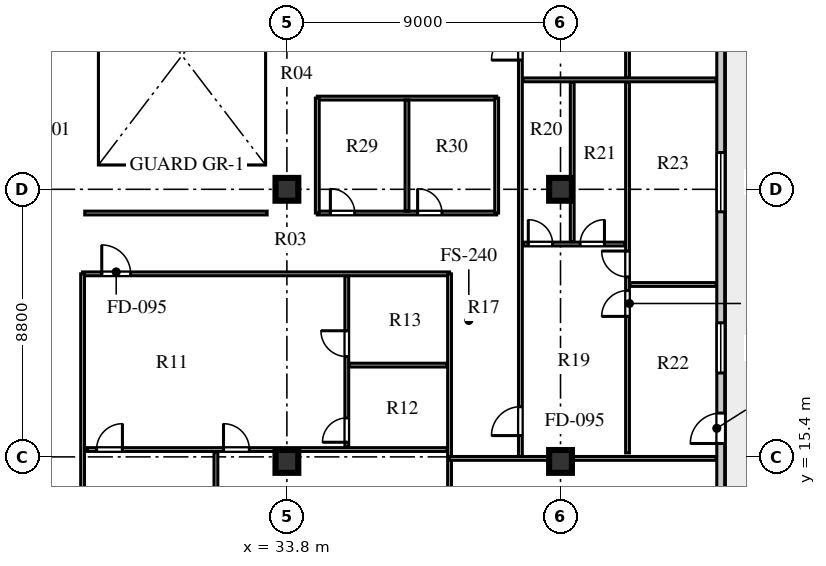
"""IFC4 building model, lengths in metres.
Left out: names, types, materials, properties, quantities, classifications, styles, units other than length and angle.
Written with IfcOpenShell. Run it as: python <this file> out.ifc"""

import sys

from ifc_helpers import new_model, si_unit, direction, frame, frame_2d, origin, origin_2d, place, context, subcontext, project, spatial, rectangle, extrude, element, fill, save


model = new_model("IFC4")
c1 = context("Model", 3, precision=1e-05, world=origin(), true_north=direction((0.0, 1.0)))
c2 = subcontext(c1, "Body", "Model", "MODEL_VIEW")
j1 = project(units=[si_unit("LENGTHUNIT", "METRE"), si_unit("PLANEANGLEUNIT", "RADIAN")], contexts=[c1])
p1 = place(None, origin())
s1 = spatial("IfcSite", under=j1, at=p1, CompositionType="ELEMENT")
p2 = place(p1, origin())
s2 = spatial("IfcBuilding", under=s1, at=p2, CompositionType="ELEMENT")
p3 = place(p2, frame((0.0, 0.0, 272.6)))
s3 = spatial("IfcBuildingStorey", under=s2, at=p3, CompositionType="ELEMENT", Elevation=272.6)
for number, where, z_axis, x_axis in (
    (1, (33.8, 15.25, 0.0), (0.0, 0.0, 1.0), (1.0, 0.0, 0.0)),
    (2, (33.8, 24.2, 0.0), (0.0, 0.0, 1.0), (1.0, 0.0, 0.0)),
    (3, (42.8, 15.25, 0.0), (0.0, 0.0, 1.0), (1.0, 0.0, 0.0)),
    (4, (42.8, 24.2, 0.0), (0.0, 0.0, 1.0), (1.0, 0.0, 0.0)),
):
    element("IfcColumn", number, at=place(p3, frame(where, z_axis=z_axis, x_axis=x_axis)), inside=s3, PredefinedType="COLUMN", context=c2, shape_type="SweptSolid", body=[
        extrude(rectangle(XDim=0.75, YDim=0.75, at=origin_2d()), origin(), (0.0, 0.0, 1.0), 3.66),
    ])
p4 = place(p3, frame((48.07, 13.41, 0.0), z_axis=(0.0, 0.0, 1.0), x_axis=(0.0, 1.0, 0.0)))
e5 = element("IfcWall", 5, at=p4, inside=s3, PredefinedType="SOLIDWALL", context=c2, shape_type="SweptSolid", body=[
    extrude(rectangle(XDim=30.38, YDim=0.26, at=frame_2d((15.19, 0.0))), origin(), (0.0, 0.0, 1.0), 3.66),
])
p5 = place(p4, frame((2.43, 0.0, 0.0)))
e6 = element("IfcOpeningElement", 6, at=p5, cuts=e5, PredefinedType="OPENING", context=c2, shape_type="SweptSolid", body=[
    extrude(rectangle(XDim=1.0, YDim=2.05, at=frame_2d((0.5, 1.025))), frame((0.0, 0.14, 0.0), z_axis=(0.0, -1.0, 0.0), x_axis=(1.0, 0.0, 0.0)), (0.0, 0.0, 1.0), 0.28),
])
p6 = place(p4, frame((4.75, 0.0, 0.8)))
e7 = element("IfcOpeningElement", 7, at=p6, cuts=e5, PredefinedType="OPENING", context=c2, shape_type="SweptSolid", body=[
    extrude(rectangle(XDim=1.65, YDim=1.95, at=frame_2d((0.825, 0.975))), frame((0.0, 0.14, 0.0), z_axis=(0.0, -1.0, 0.0), x_axis=(1.0, 0.0, 0.0)), (0.0, 0.0, 1.0), 0.28),
])
p7 = place(p4, frame((10.05, 0.0, 0.8)))
e8 = element("IfcOpeningElement", 8, at=p7, cuts=e5, PredefinedType="OPENING", context=c2, shape_type="SweptSolid", body=[
    extrude(rectangle(XDim=1.95, YDim=2.0, at=frame_2d((0.975, 1.0))), frame((0.0, 0.14, 0.0), z_axis=(0.0, -1.0, 0.0), x_axis=(1.0, 0.0, 0.0)), (0.0, 0.0, 1.0), 0.28),
])
p8 = place(p4, frame((16.753, 0.0, 0.8)))
e9 = element("IfcOpeningElement", 9, at=p8, cuts=e5, PredefinedType="OPENING", context=c2, shape_type="SweptSolid", body=[
    extrude(rectangle(XDim=2.25, YDim=2.0, at=frame_2d((1.125, 1.0))), frame((0.0, 0.14, 0.0), z_axis=(0.0, -1.0, 0.0), x_axis=(1.0, 0.0, 0.0)), (0.0, 0.0, 1.0), 0.28),
])
p9 = place(p4, frame((24.003, 0.0, 0.8)))
e10 = element("IfcOpeningElement", 10, at=p9, cuts=e5, PredefinedType="OPENING", context=c2, shape_type="SweptSolid", body=[
    extrude(rectangle(XDim=1.8, YDim=2.0, at=frame_2d((0.9, 1.0))), frame((0.0, 0.14, 0.0), z_axis=(0.0, -1.0, 0.0), x_axis=(1.0, 0.0, 0.0)), (0.0, 0.0, 1.0), 0.28),
])
p10 = place(p3, frame((27.08, 21.42, 0.0), z_axis=(0.0, 0.0, 1.0), x_axis=(1.0, 0.0, 0.0)))
e11 = element("IfcWall", 11, at=p10, inside=s3, PredefinedType="PLUMBINGWALL", context=c2, shape_type="SweptSolid", body=[
    extrude(rectangle(XDim=12.07, YDim=0.125, at=frame_2d((6.035, 0.0))), origin(), (0.0, 0.0, 1.0), 3.36),
])
p11 = place(p10, frame((0.63, 0.0, 0.0)))
e12 = element("IfcOpeningElement", 12, at=p11, cuts=e11, PredefinedType="OPENING", context=c2, shape_type="SweptSolid", body=[
    extrude(rectangle(XDim=0.95, YDim=2.1, at=frame_2d((0.475, 1.05))), frame((0.0, 0.073, 0.0), z_axis=(0.0, -1.0, 0.0), x_axis=(1.0, 0.0, 0.0)), (0.0, 0.0, 1.0), 0.145),
])
p12 = place(p3, frame((27.08, 10.38, 0.0), z_axis=(0.0, 0.0, 1.0), x_axis=(0.0, 1.0, 0.0)))
e13 = element("IfcWall", 13, at=p12, inside=s3, PredefinedType="PLUMBINGWALL", context=c2, shape_type="SweptSolid", body=[
    extrude(rectangle(XDim=11.04, YDim=0.125, at=frame_2d((5.52, 0.0))), origin(), (0.0, 0.0, 1.0), 3.66),
])
p13 = place(p3, frame((27.15, 23.42, 0.0), z_axis=(0.0, 0.0, 1.0), x_axis=(1.0, 0.0, 0.0)))
e14 = element("IfcWall", 14, at=p13, inside=s3, PredefinedType="PLUMBINGWALL", context=c2, shape_type="SweptSolid", body=[
    extrude(rectangle(XDim=6.0, YDim=0.125, at=frame_2d((3.0, 0.0))), origin(), (0.0, 0.0, 1.0), 3.66),
])
p14 = place(p3, frame((39.15, 10.38, 0.0), z_axis=(0.0, 0.0, 1.0), x_axis=(0.0, 1.0, 0.0)))
e15 = element("IfcWall", 15, at=p14, inside=s3, PredefinedType="PLUMBINGWALL", context=c2, shape_type="SweptSolid", body=[
    extrude(rectangle(XDim=11.04, YDim=0.125, at=frame_2d((5.52, 0.0))), origin(), (0.0, 0.0, 1.0), 3.66),
])
p15 = place(p3, frame((27.24, 15.641, 0.0), z_axis=(0.0, 0.0, 1.0), x_axis=(1.0, 0.0, 0.0)))
e16 = element("IfcWall", 16, at=p15, inside=s3, PredefinedType="PLUMBINGWALL", context=c2, shape_type="SweptSolid", body=[
    extrude(rectangle(XDim=11.83, YDim=0.125, at=frame_2d((5.915, 0.0))), origin(), (0.0, 0.0, 1.0), 3.66),
])
p16 = place(p15, frame((0.3, 0.0, 0.0)))
e17 = element("IfcOpeningElement", 17, at=p16, cuts=e16, PredefinedType="OPENING", context=c2, shape_type="SweptSolid", body=[
    extrude(rectangle(XDim=0.85, YDim=2.08, at=frame_2d((0.425, 1.04))), frame((0.0, 0.073, 0.0), z_axis=(0.0, -1.0, 0.0), x_axis=(1.0, 0.0, 0.0)), (0.0, 0.0, 1.0), 0.145),
])
p17 = place(p15, frame((4.475, 0.0, 0.0)))
e18 = element("IfcOpeningElement", 18, at=p17, cuts=e16, PredefinedType="OPENING", context=c2, shape_type="SweptSolid", body=[
    extrude(rectangle(XDim=0.85, YDim=2.08, at=frame_2d((0.425, 1.04))), frame((0.0, 0.073, 0.0), z_axis=(0.0, -1.0, 0.0), x_axis=(1.0, 0.0, 0.0)), (0.0, 0.0, 1.0), 0.145),
])
p18 = place(p3, frame((35.77, 15.721, 0.0), z_axis=(0.0, 0.0, 1.0), x_axis=(0.0, 1.0, 0.0)))
e19 = element("IfcWall", 19, at=p18, inside=s3, PredefinedType="PLUMBINGWALL", context=c2, shape_type="SweptSolid", body=[
    extrude(rectangle(XDim=5.619, YDim=0.125, at=frame_2d((2.81, 0.0))), origin(), (0.0, 0.0, 1.0), 3.66),
])
p19 = place(p18, frame((0.16, 0.0, 0.0)))
e20 = element("IfcOpeningElement", 20, at=p19, cuts=e19, PredefinedType="OPENING", context=c2, shape_type="SweptSolid", body=[
    extrude(rectangle(XDim=0.8, YDim=2.05, at=frame_2d((0.4, 1.025))), frame((0.0, 0.073, 0.0), z_axis=(0.0, -1.0, 0.0), x_axis=(1.0, 0.0, 0.0)), (0.0, 0.0, 1.0), 0.145),
])
p20 = place(p18, frame((2.977, 0.0, 0.0)))
e21 = element("IfcOpeningElement", 21, at=p20, cuts=e19, PredefinedType="OPENING", context=c2, shape_type="SweptSolid", body=[
    extrude(rectangle(XDim=0.85, YDim=2.08, at=frame_2d((0.425, 1.04))), frame((0.0, 0.073, 0.0), z_axis=(0.0, -1.0, 0.0), x_axis=(1.0, 0.0, 0.0)), (0.0, 0.0, 1.0), 0.145),
])
p21 = place(p3, frame((35.85, 18.418, 0.0), z_axis=(0.0, 0.0, 1.0), x_axis=(1.0, 0.0, 0.0)))
e22 = element("IfcWall", 22, at=p21, inside=s3, PredefinedType="PLUMBINGWALL", context=c2, shape_type="SweptSolid", body=[
    extrude(rectangle(XDim=3.22, YDim=0.125, at=frame_2d((1.61, 0.0))), origin(), (0.0, 0.0, 1.0), 3.36),
])
p22 = place(p3, frame((31.465, 10.38, 0.0), z_axis=(0.0, 0.0, 1.0), x_axis=(0.0, 1.0, 0.0)))
e23 = element("IfcWall", 23, at=p22, inside=s3, PredefinedType="PLUMBINGWALL", context=c2, shape_type="SweptSolid", body=[
    extrude(rectangle(XDim=5.181, YDim=0.125, at=frame_2d((2.591, 0.0))), origin(), (0.0, 0.0, 1.0), 3.66),
])
p23 = place(p3, frame((41.48, 15.35, 0.0), z_axis=(0.0, 0.0, 1.0), x_axis=(0.0, 1.0, 0.0)))
e24 = element("IfcWall", 24, at=p23, inside=s3, PredefinedType="PLUMBINGWALL", context=c2, shape_type="SweptSolid", body=[
    extrude(rectangle(XDim=26.5, YDim=0.125, at=frame_2d((13.25, 0.0))), origin(), (0.0, 0.0, 1.0), 3.66),
])
p24 = place(p23, frame((0.75, 0.0, 0.0)))
e25 = element("IfcOpeningElement", 25, at=p24, cuts=e24, PredefinedType="OPENING", context=c2, shape_type="SweptSolid", body=[
    extrude(rectangle(XDim=0.95, YDim=2.1, at=frame_2d((0.475, 1.05))), frame((0.0, 0.073, 0.0), z_axis=(0.0, -1.0, 0.0), x_axis=(1.0, 0.0, 0.0)), (0.0, 0.0, 1.0), 0.145),
])
p25 = place(p23, frame((13.1, 0.0, 0.0)))
e26 = element("IfcOpeningElement", 26, at=p25, cuts=e24, PredefinedType="OPENING", context=c2, shape_type="SweptSolid", body=[
    extrude(rectangle(XDim=0.95, YDim=2.1, at=frame_2d((0.475, 1.05))), frame((0.0, 0.073, 0.0), z_axis=(0.0, -1.0, 0.0), x_axis=(1.0, 0.0, 0.0)), (0.0, 0.0, 1.0), 0.145),
])
p26 = place(p3, frame((39.15, 15.35, 0.0), z_axis=(0.0, 0.0, 1.0), x_axis=(1.0, 0.0, 0.0)))
e27 = element("IfcWall", 27, at=p26, inside=s3, PredefinedType="PLUMBINGWALL", context=c2, shape_type="SweptSolid", body=[
    extrude(rectangle(XDim=8.77, YDim=0.125, at=frame_2d((4.385, 0.0))), origin(), (0.0, 0.0, 1.0), 3.06),
])
p27 = place(p3, frame((45.004, 15.53, 0.0), z_axis=(0.0, 0.0, 1.0), x_axis=(0.0, 1.0, 0.0)))
e28 = element("IfcWall", 28, at=p27, inside=s3, PredefinedType="PLUMBINGWALL", context=c2, shape_type="SweptSolid", body=[
    extrude(rectangle(XDim=12.19, YDim=0.125, at=frame_2d((6.095, 0.0))), origin(), (0.0, 0.0, 1.0), 3.66),
])
p28 = place(p27, frame((4.49, 0.0, 0.0)))
e29 = element("IfcOpeningElement", 29, at=p28, cuts=e28, PredefinedType="OPENING", context=c2, shape_type="SweptSolid", body=[
    extrude(rectangle(XDim=0.85, YDim=2.08, at=frame_2d((0.425, 1.04))), frame((0.0, 0.073, 0.0), z_axis=(0.0, -1.0, 0.0), x_axis=(1.0, 0.0, 0.0)), (0.0, 0.0, 1.0), 0.145),
])
p29 = place(p27, frame((5.79, 0.0, 0.0)))
e30 = element("IfcOpeningElement", 30, at=p29, cuts=e28, PredefinedType="OPENING", context=c2, shape_type="SweptSolid", body=[
    extrude(rectangle(XDim=0.85, YDim=2.08, at=frame_2d((0.425, 1.04))), frame((0.0, 0.073, 0.0), z_axis=(0.0, -1.0, 0.0), x_axis=(1.0, 0.0, 0.0)), (0.0, 0.0, 1.0), 0.145),
])
p30 = place(p3, frame((41.58, 22.4, 0.0), z_axis=(0.0, 0.0, 1.0), x_axis=(1.0, 0.0, 0.0)))
e31 = element("IfcWall", 31, at=p30, inside=s3, PredefinedType="PLUMBINGWALL", context=c2, shape_type="SweptSolid", body=[
    extrude(rectangle(XDim=3.344, YDim=0.125, at=frame_2d((1.672, 0.0))), origin(), (0.0, 0.0, 1.0), 3.66),
])
p31 = place(p30, frame((0.16, 0.0, 0.0)))
e32 = element("IfcOpeningElement", 32, at=p31, cuts=e31, PredefinedType="OPENING", context=c2, shape_type="SweptSolid", body=[
    extrude(rectangle(XDim=0.8, YDim=2.05, at=frame_2d((0.4, 1.025))), frame((0.0, 0.073, 0.0), z_axis=(0.0, -1.0, 0.0), x_axis=(1.0, 0.0, 0.0)), (0.0, 0.0, 1.0), 0.145),
])
p32 = place(p30, frame((1.865, 0.0, 0.0)))
e33 = element("IfcOpeningElement", 33, at=p32, cuts=e31, PredefinedType="OPENING", context=c2, shape_type="SweptSolid", body=[
    extrude(rectangle(XDim=0.8, YDim=2.05, at=frame_2d((0.4, 1.025))), frame((0.0, 0.073, 0.0), z_axis=(0.0, -1.0, 0.0), x_axis=(1.0, 0.0, 0.0)), (0.0, 0.0, 1.0), 0.145),
])
p33 = place(p3, frame((43.185, 22.48, 0.0), z_axis=(0.0, 0.0, 1.0), x_axis=(0.0, 1.0, 0.0)))
e34 = element("IfcWall", 34, at=p33, inside=s3, PredefinedType="PLUMBINGWALL", context=c2, shape_type="SweptSolid", body=[
    extrude(rectangle(XDim=5.24, YDim=0.125, at=frame_2d((2.62, 0.0))), origin(), (0.0, 0.0, 1.0), 3.66),
])
p34 = place(p3, frame((45.084, 21.07, 0.0), z_axis=(0.0, 0.0, 1.0), x_axis=(1.0, 0.0, 0.0)))
e35 = element("IfcWall", 35, at=p34, inside=s3, PredefinedType="PLUMBINGWALL", context=c2, shape_type="SweptSolid", body=[
    extrude(rectangle(XDim=2.836, YDim=0.125, at=frame_2d((1.418, 0.0))), origin(), (0.0, 0.0, 1.0), 3.66),
])
p35 = place(p3, frame((41.56, 27.8, 0.0), z_axis=(0.0, 0.0, 1.0), x_axis=(1.0, 0.0, 0.0)))
e36 = element("IfcWall", 36, at=p35, inside=s3, PredefinedType="PLUMBINGWALL", context=c2, shape_type="SweptSolid", body=[
    extrude(rectangle(XDim=6.36, YDim=0.125, at=frame_2d((3.18, 0.0))), origin(), (0.0, 0.0, 1.0), 3.66),
])
p36 = place(p3, frame((45.004, 27.88, 0.0), z_axis=(0.0, 0.0, 1.0), x_axis=(0.0, 1.0, 0.0)))
e37 = element("IfcWall", 37, at=p36, inside=s3, PredefinedType="PLUMBINGWALL", context=c2, shape_type="SweptSolid", body=[
    extrude(rectangle(XDim=13.79, YDim=0.125, at=frame_2d((6.895, 0.0))), origin(), (0.0, 0.0, 1.0), 3.66),
])
p37 = place(p36, frame((5.845, 0.0, 0.0)))
e38 = element("IfcOpeningElement", 38, at=p37, cuts=e37, PredefinedType="OPENING", context=c2, shape_type="SweptSolid", body=[
    extrude(rectangle(XDim=0.85, YDim=2.08, at=frame_2d((0.425, 1.04))), frame((0.0, 0.073, 0.0), z_axis=(0.0, -1.0, 0.0), x_axis=(1.0, 0.0, 0.0)), (0.0, 0.0, 1.0), 0.145),
])
p38 = place(p36, frame((7.145, 0.0, 0.0)))
e39 = element("IfcOpeningElement", 39, at=p38, cuts=e37, PredefinedType="OPENING", context=c2, shape_type="SweptSolid", body=[
    extrude(rectangle(XDim=0.85, YDim=2.08, at=frame_2d((0.425, 1.04))), frame((0.0, 0.073, 0.0), z_axis=(0.0, -1.0, 0.0), x_axis=(1.0, 0.0, 0.0)), (0.0, 0.0, 1.0), 0.145),
])
p39 = place(p3, frame((34.8, 23.42, 0.0), z_axis=(0.0, 0.0, 1.0), x_axis=(1.0, 0.0, 0.0)))
e40 = element("IfcWall", 40, at=p39, inside=s3, PredefinedType="PLUMBINGWALL", context=c2, shape_type="SweptSolid", body=[
    extrude(rectangle(XDim=5.9, YDim=0.125, at=frame_2d((2.95, 0.0))), origin(), (0.0, 0.0, 1.0), 3.66),
])
p40 = place(p39, frame((0.43, 0.0, 0.0)))
e41 = element("IfcOpeningElement", 41, at=p40, cuts=e40, PredefinedType="OPENING", context=c2, shape_type="SweptSolid", body=[
    extrude(rectangle(XDim=0.8, YDim=2.05, at=frame_2d((0.4, 1.025))), frame((0.0, 0.073, 0.0), z_axis=(0.0, -1.0, 0.0), x_axis=(1.0, 0.0, 0.0)), (0.0, 0.0, 1.0), 0.145),
])
p41 = place(p39, frame((3.3, 0.0, 0.0)))
e42 = element("IfcOpeningElement", 42, at=p41, cuts=e40, PredefinedType="OPENING", context=c2, shape_type="SweptSolid", body=[
    extrude(rectangle(XDim=0.8, YDim=2.05, at=frame_2d((0.4, 1.025))), frame((0.0, 0.073, 0.0), z_axis=(0.0, -1.0, 0.0), x_axis=(1.0, 0.0, 0.0)), (0.0, 0.0, 1.0), 0.145),
])
p42 = place(p3, frame((34.8, 27.2, 0.0), z_axis=(0.0, 0.0, 1.0), x_axis=(1.0, 0.0, 0.0)))
e43 = element("IfcWall", 43, at=p42, inside=s3, PredefinedType="PLUMBINGWALL", context=c2, shape_type="SweptSolid", body=[
    extrude(rectangle(XDim=5.9, YDim=0.125, at=frame_2d((2.95, 0.0))), origin(), (0.0, 0.0, 1.0), 3.36),
])
for number, where, z_axis, x_axis in (
    (44, (34.8, 23.42, 0.0), (0.0, 0.0, 1.0), (0.0, 1.0, 0.0)),
    (45, (40.7, 23.42, 0.0), (0.0, 0.0, 1.0), (0.0, 1.0, 0.0)),
):
    element("IfcWall", number, at=place(p3, frame(where, z_axis=z_axis, x_axis=x_axis)), inside=s3, PredefinedType="PLUMBINGWALL", context=c2, shape_type="SweptSolid", body=[
        extrude(rectangle(XDim=3.78, YDim=0.125, at=frame_2d((1.89, 0.0))), origin(), (0.0, 0.0, 1.0), 3.66),
    ])
p43 = place(p3, frame((37.75, 23.48, 0.0), z_axis=(0.0, 0.0, 1.0), x_axis=(0.0, 1.0, 0.0)))
e46 = element("IfcWall", 46, at=p43, inside=s3, PredefinedType="PLUMBINGWALL", context=c2, shape_type="SweptSolid", body=[
    extrude(rectangle(XDim=3.66, YDim=0.125, at=frame_2d((1.83, 0.0))), origin(), (0.0, 0.0, 1.0), 3.66),
])
p44 = place(p5, frame((1.0, 0.0, 0.0), z_axis=(0.0, 0.0, 1.0), x_axis=(-1.0, 0.0, 0.0)))
e47 = element("IfcDoor", 47, at=p44, inside=s3, OperationType="SINGLE_SWING_RIGHT", PredefinedType="DOOR", context=c2, shape_type="SweptSolid", body=[
    extrude(rectangle(XDim=1.0, YDim=2.05, at=frame_2d((0.5, 1.025))), frame((0.0, 0.025, 0.0), z_axis=(0.0, -1.0, 0.0), x_axis=(1.0, 0.0, 0.0)), (0.0, 0.0, 1.0), 0.05),
])
fill(e6, e47)
p45 = place(p6, origin())
e48 = element("IfcWindow", 48, at=p45, inside=s3, PartitioningType="SINGLE_PANEL", PredefinedType="WINDOW", context=c2, shape_type="SweptSolid", body=[
    extrude(rectangle(XDim=1.65, YDim=1.95, at=frame_2d((0.825, 0.975))), frame((0.0, 0.03, 0.0), z_axis=(0.0, -1.0, 0.0), x_axis=(1.0, 0.0, 0.0)), (0.0, 0.0, 1.0), 0.06),
])
fill(e7, e48)
p46 = place(p7, origin())
e49 = element("IfcWindow", 49, at=p46, inside=s3, PartitioningType="SINGLE_PANEL", PredefinedType="WINDOW", context=c2, shape_type="SweptSolid", body=[
    extrude(rectangle(XDim=1.95, YDim=2.0, at=frame_2d((0.975, 1.0))), frame((0.0, 0.03, 0.0), z_axis=(0.0, -1.0, 0.0), x_axis=(1.0, 0.0, 0.0)), (0.0, 0.0, 1.0), 0.06),
])
fill(e8, e49)
p47 = place(p19, origin())
e50 = element("IfcDoor", 50, at=p47, inside=s3, OperationType="SINGLE_SWING_LEFT", PredefinedType="DOOR", context=c2, shape_type="SweptSolid", body=[
    extrude(rectangle(XDim=0.8, YDim=2.05, at=frame_2d((0.4, 1.025))), frame((0.0, 0.025, 0.0), z_axis=(0.0, -1.0, 0.0), x_axis=(1.0, 0.0, 0.0)), (0.0, 0.0, 1.0), 0.05),
])
fill(e20, e50)
p48 = place(p20, origin())
e51 = element("IfcDoor", 51, at=p48, inside=s3, OperationType="SINGLE_SWING_RIGHT", PredefinedType="DOOR", context=c2, shape_type="SweptSolid", body=[
    extrude(rectangle(XDim=0.85, YDim=2.08, at=frame_2d((0.425, 1.04))), frame((0.0, 0.025, 0.0), z_axis=(0.0, -1.0, 0.0), x_axis=(1.0, 0.0, 0.0)), (0.0, 0.0, 1.0), 0.05),
])
fill(e21, e51)
p49 = place(p16, frame((0.85, 0.0, 0.0), z_axis=(0.0, 0.0, 1.0), x_axis=(-1.0, 0.0, 0.0)))
e52 = element("IfcDoor", 52, at=p49, inside=s3, OperationType="SINGLE_SWING_LEFT", PredefinedType="DOOR", context=c2, shape_type="SweptSolid", body=[
    extrude(rectangle(XDim=0.85, YDim=2.08, at=frame_2d((0.425, 1.04))), frame((0.0, 0.025, 0.0), z_axis=(0.0, -1.0, 0.0), x_axis=(1.0, 0.0, 0.0)), (0.0, 0.0, 1.0), 0.05),
])
fill(e17, e52)
p50 = place(p17, frame((0.85, 0.0, 0.0), z_axis=(0.0, 0.0, 1.0), x_axis=(-1.0, 0.0, 0.0)))
e53 = element("IfcDoor", 53, at=p50, inside=s3, OperationType="SINGLE_SWING_RIGHT", PredefinedType="DOOR", context=c2, shape_type="SweptSolid", body=[
    extrude(rectangle(XDim=0.85, YDim=2.08, at=frame_2d((0.425, 1.04))), frame((0.0, 0.025, 0.0), z_axis=(0.0, -1.0, 0.0), x_axis=(1.0, 0.0, 0.0)), (0.0, 0.0, 1.0), 0.05),
])
fill(e18, e53)
p51 = place(p11, frame((0.95, 0.0, 0.0), z_axis=(0.0, 0.0, 1.0), x_axis=(-1.0, 0.0, 0.0)))
e54 = element("IfcDoor", 54, at=p51, inside=s3, OperationType="SINGLE_SWING_RIGHT", PredefinedType="DOOR", context=c2, shape_type="SweptSolid", body=[
    extrude(rectangle(XDim=0.95, YDim=2.1, at=frame_2d((0.475, 1.05))), frame((0.0, 0.025, 0.0), z_axis=(0.0, -1.0, 0.0), x_axis=(1.0, 0.0, 0.0)), (0.0, 0.0, 1.0), 0.05),
])
fill(e12, e54)
p52 = place(p31, origin())
e55 = element("IfcDoor", 55, at=p52, inside=s3, OperationType="SINGLE_SWING_LEFT", PredefinedType="DOOR", context=c2, shape_type="SweptSolid", body=[
    extrude(rectangle(XDim=0.8, YDim=2.05, at=frame_2d((0.4, 1.025))), frame((0.0, 0.025, 0.0), z_axis=(0.0, -1.0, 0.0), x_axis=(1.0, 0.0, 0.0)), (0.0, 0.0, 1.0), 0.05),
])
fill(e32, e55)
p53 = place(p32, origin())
e56 = element("IfcDoor", 56, at=p53, inside=s3, OperationType="SINGLE_SWING_RIGHT", PredefinedType="DOOR", context=c2, shape_type="SweptSolid", body=[
    extrude(rectangle(XDim=0.8, YDim=2.05, at=frame_2d((0.4, 1.025))), frame((0.0, 0.025, 0.0), z_axis=(0.0, -1.0, 0.0), x_axis=(1.0, 0.0, 0.0)), (0.0, 0.0, 1.0), 0.05),
])
fill(e33, e56)
p54 = place(p28, origin())
e57 = element("IfcDoor", 57, at=p54, inside=s3, OperationType="SINGLE_SWING_LEFT", PredefinedType="DOOR", context=c2, shape_type="SweptSolid", body=[
    extrude(rectangle(XDim=0.85, YDim=2.08, at=frame_2d((0.425, 1.04))), frame((0.0, 0.025, 0.0), z_axis=(0.0, -1.0, 0.0), x_axis=(1.0, 0.0, 0.0)), (0.0, 0.0, 1.0), 0.05),
])
fill(e29, e57)
p55 = place(p29, origin())
e58 = element("IfcDoor", 58, at=p55, inside=s3, OperationType="SINGLE_SWING_RIGHT", PredefinedType="DOOR", context=c2, shape_type="SweptSolid", body=[
    extrude(rectangle(XDim=0.85, YDim=2.08, at=frame_2d((0.425, 1.04))), frame((0.0, 0.025, 0.0), z_axis=(0.0, -1.0, 0.0), x_axis=(1.0, 0.0, 0.0)), (0.0, 0.0, 1.0), 0.05),
])
fill(e30, e58)
p56 = place(p24, origin())
e59 = element("IfcDoor", 59, at=p56, inside=s3, OperationType="SINGLE_SWING_LEFT", PredefinedType="DOOR", context=c2, shape_type="SweptSolid", body=[
    extrude(rectangle(XDim=0.95, YDim=2.1, at=frame_2d((0.475, 1.05))), frame((0.0, 0.025, 0.0), z_axis=(0.0, -1.0, 0.0), x_axis=(1.0, 0.0, 0.0)), (0.0, 0.0, 1.0), 0.05),
])
fill(e25, e59)
p57 = place(p25, origin())
e60 = element("IfcDoor", 60, at=p57, inside=s3, OperationType="SINGLE_SWING_LEFT", PredefinedType="DOOR", context=c2, shape_type="SweptSolid", body=[
    extrude(rectangle(XDim=0.95, YDim=2.1, at=frame_2d((0.475, 1.05))), frame((0.0, 0.025, 0.0), z_axis=(0.0, -1.0, 0.0), x_axis=(1.0, 0.0, 0.0)), (0.0, 0.0, 1.0), 0.05),
])
fill(e26, e60)
p58 = place(p40, origin())
e61 = element("IfcDoor", 61, at=p58, inside=s3, OperationType="SINGLE_SWING_LEFT", PredefinedType="DOOR", context=c2, shape_type="SweptSolid", body=[
    extrude(rectangle(XDim=0.8, YDim=2.05, at=frame_2d((0.4, 1.025))), frame((0.0, 0.025, 0.0), z_axis=(0.0, -1.0, 0.0), x_axis=(1.0, 0.0, 0.0)), (0.0, 0.0, 1.0), 0.05),
])
fill(e41, e61)
p59 = place(p41, origin())
e62 = element("IfcDoor", 62, at=p59, inside=s3, OperationType="SINGLE_SWING_LEFT", PredefinedType="DOOR", context=c2, shape_type="SweptSolid", body=[
    extrude(rectangle(XDim=0.8, YDim=2.05, at=frame_2d((0.4, 1.025))), frame((0.0, 0.025, 0.0), z_axis=(0.0, -1.0, 0.0), x_axis=(1.0, 0.0, 0.0)), (0.0, 0.0, 1.0), 0.05),
])
fill(e42, e62)
save(model, sys.argv[1])
